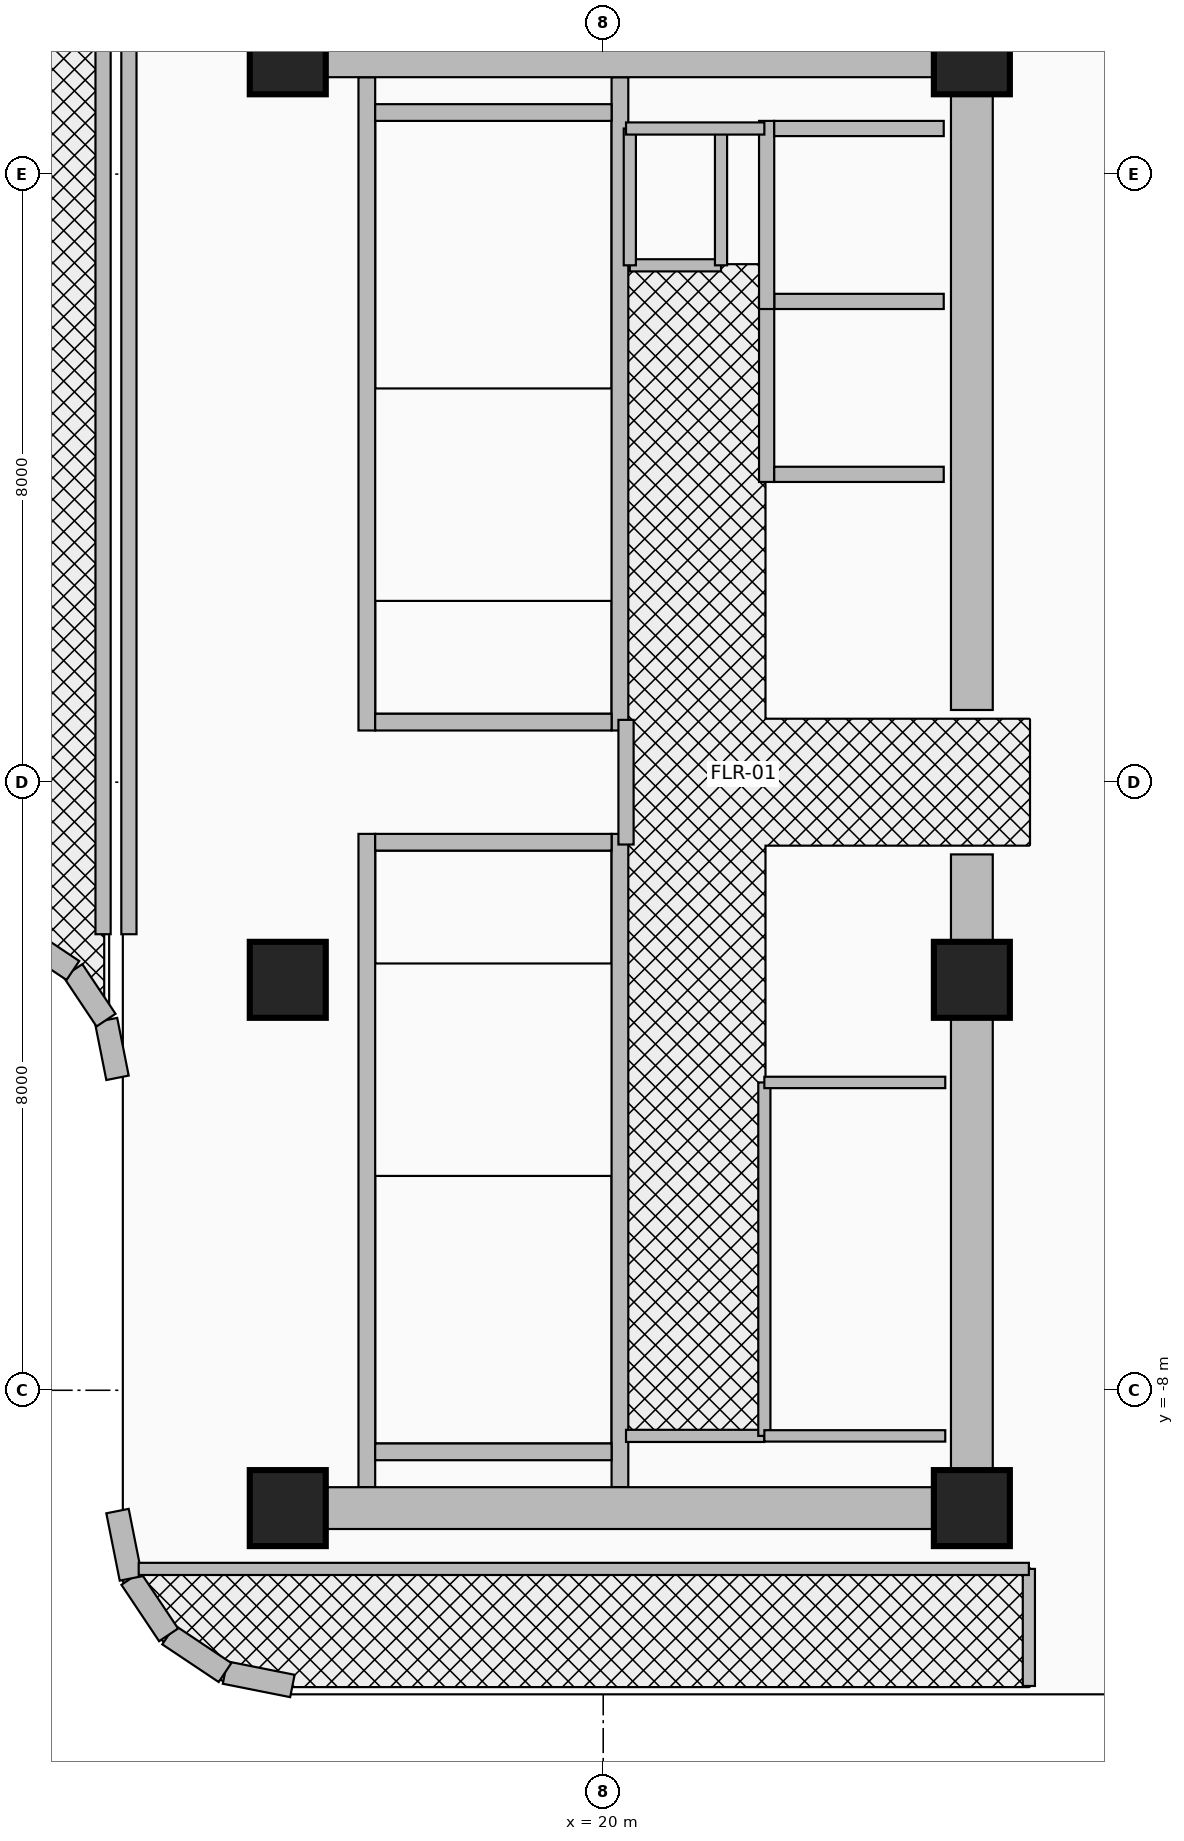
"""IFC4 building model, lengths in metres.
Left out: names, types, materials, properties, quantities, classifications, styles, units other than length and angle.
Written with IfcOpenShell. Run it as: python <this file> out.ifc"""

import sys

from ifc_helpers import new_model, si_unit, direction, frame, frame_2d, origin, origin_2d, place, context, subcontext, project, spatial, rectangle, extrude, source, transform, mapped, element, fill, save


model = new_model("IFC4")
c1 = context("Model", 3, precision=1e-05, world=origin(), true_north=direction((0.0, 1.0)))
c2 = subcontext(c1, "Body", "Model", "MODEL_VIEW")
j1 = project(units=[si_unit("LENGTHUNIT", "METRE"), si_unit("PLANEANGLEUNIT", "RADIAN")], contexts=[c1])
p1 = place(None, origin())
s1 = spatial("IfcSite", under=j1, at=p1, CompositionType="ELEMENT")
p2 = place(p1, origin())
s2 = spatial("IfcBuilding", under=s1, at=p2, CompositionType="ELEMENT")
p3 = place(p2, frame((0.0, 0.0, 180.5)))
s3 = spatial("IfcBuildingStorey", under=s2, at=p3, CompositionType="ELEMENT", Elevation=180.5)
for number, where, z_axis, x_axis in (
    (1, (16.89, 0.68, 0.0), (0.0, 0.0, 1.0), (0.0, 1.0, 0.0)),
    (2, (20.22, 0.68, 0.0), (0.0, 0.0, 1.0), (0.0, 1.0, 0.0)),
):
    element("IfcWall", number, at=place(p3, frame(where, z_axis=z_axis, x_axis=x_axis)), inside=s3, PredefinedType="SHEAR", context=c2, shape_type="SweptSolid", body=[
        extrude(rectangle(XDim=8.595, YDim=0.22, at=frame_2d((4.297, 0.0))), origin(), (0.0, 0.0, 1.0), 3.63),
    ])
p4 = place(p3, frame((17.0, 0.79, 0.0), z_axis=(0.0, 0.0, 1.0), x_axis=(1.0, 0.0, 0.0)))
e3 = element("IfcWall", 3, at=p4, inside=s3, PredefinedType="SHEAR", context=c2, shape_type="SweptSolid", body=[
    extrude(rectangle(XDim=3.11, YDim=0.22, at=frame_2d((1.555, 0.0))), origin(), (0.0, 0.0, 1.0), 3.63),
])
p5 = place(p4, frame((0.95, 0.0, 0.0)))
e4 = element("IfcOpeningElement", 4, at=p5, cuts=e3, PredefinedType="OPENING", context=c2, shape_type="SweptSolid", body=[
    extrude(rectangle(XDim=1.1, YDim=2.15, at=frame_2d((0.55, 1.075))), frame((0.0, 0.125, 0.0), z_axis=(0.0, -1.0, 0.0), x_axis=(1.0, 0.0, 0.0)), (0.0, 0.0, 1.0), 0.25),
])
p6 = place(p3, frame((17.0, 8.81, 0.0), z_axis=(0.0, 0.0, 1.0), x_axis=(1.0, 0.0, 0.0)))
e5 = element("IfcWall", 5, at=p6, inside=s3, PredefinedType="SHEAR", context=c2, shape_type="SweptSolid", body=[
    extrude(rectangle(XDim=3.11, YDim=0.22, at=frame_2d((1.555, 0.0))), origin(), (0.0, 0.0, 1.0), 3.63),
])
for number, where, z_axis, x_axis in (
    (6, (16.89, -9.275, 0.0), (0.0, 0.0, 1.0), (0.0, 1.0, 0.0)),
    (7, (20.22, -9.275, 0.0), (0.0, 0.0, 1.0), (0.0, 1.0, 0.0)),
):
    element("IfcWall", number, at=place(p3, frame(where, z_axis=z_axis, x_axis=x_axis)), inside=s3, PredefinedType="SHEAR", context=c2, shape_type="SweptSolid", body=[
        extrude(rectangle(XDim=8.595, YDim=0.22, at=frame_2d((4.297, 0.0))), origin(), (0.0, 0.0, 1.0), 3.63),
    ])
p7 = place(p3, frame((17.0, -8.81, 0.0), z_axis=(0.0, 0.0, 1.0), x_axis=(1.0, 0.0, 0.0)))
e8 = element("IfcWall", 8, at=p7, inside=s3, PredefinedType="SHEAR", context=c2, shape_type="SweptSolid", body=[
    extrude(rectangle(XDim=3.11, YDim=0.22, at=frame_2d((1.555, 0.0))), origin(), (0.0, 0.0, 1.0), 3.63),
])
p8 = place(p3, frame((17.0, -0.79, 0.0), z_axis=(0.0, 0.0, 1.0), x_axis=(1.0, 0.0, 0.0)))
e9 = element("IfcWall", 9, at=p8, inside=s3, PredefinedType="SHEAR", context=c2, shape_type="SweptSolid", body=[
    extrude(rectangle(XDim=3.11, YDim=0.22, at=frame_2d((1.555, 0.0))), origin(), (0.0, 0.0, 1.0), 3.63),
])
p9 = place(p8, frame((0.95, 0.0, 0.0)))
e10 = element("IfcOpeningElement", 10, at=p9, cuts=e9, PredefinedType="OPENING", context=c2, shape_type="SweptSolid", body=[
    extrude(rectangle(XDim=1.1, YDim=2.15, at=frame_2d((0.55, 1.075))), frame((0.0, 0.125, 0.0), z_axis=(0.0, -1.0, 0.0), x_axis=(1.0, 0.0, 0.0)), (0.0, 0.0, 1.0), 0.25),
])
for number, where, z_axis, x_axis in (
    (11, (24.85, -9.825, 0.0), (0.0, 0.0, 1.0), (0.0, 1.0, 0.0)),
    (12, (24.85, 0.95, 0.0), (0.0, 0.0, 1.0), (0.0, 1.0, 0.0)),
):
    element("IfcWall", number, at=place(p3, frame(where, z_axis=z_axis, x_axis=x_axis)), inside=s3, PredefinedType="SHEAR", context=c2, shape_type="SweptSolid", body=[
        extrude(rectangle(XDim=8.875, YDim=0.55, at=frame_2d((4.438, 0.0))), origin(), (0.0, 0.0, 1.0), 3.63),
    ])
for number, where, z_axis, x_axis in (
    (13, (15.85, 9.55, 0.0), (0.0, 0.0, 1.0), (1.0, 0.0, 0.0)),
    (14, (15.85, -9.55, 0.0), (0.0, 0.0, 1.0), (1.0, 0.0, 0.0)),
):
    element("IfcWall", number, at=place(p3, frame(where, z_axis=z_axis, x_axis=x_axis)), inside=s3, PredefinedType="SHEAR", context=c2, shape_type="SweptSolid", body=[
        extrude(rectangle(XDim=9.0, YDim=0.55, at=frame_2d((4.5, 0.0))), origin(), (0.0, 0.0, 1.0), 3.63),
    ])
m1 = source(origin(), c2, "Body", "SweptSolid", [
    extrude(rectangle(XDim=1.0, YDim=1.0, at=origin_2d()), origin(), (0.0, 0.0, 1.0), 3.95),
])
for number, where, z_axis, x_axis in (
    (15, (15.85, -9.55, 0.0), (0.0, 0.0, 1.0), (1.0, 0.0, 0.0)),
    (16, (24.85, -9.55, 0.0), (0.0, 0.0, 1.0), (1.0, 0.0, 0.0)),
    (17, (15.85, -2.6, 0.0), (0.0, 0.0, 1.0), (1.0, 0.0, 0.0)),
    (18, (24.85, -2.6, 0.0), (0.0, 0.0, 1.0), (1.0, 0.0, 0.0)),
    (19, (15.85, 9.55, 0.0), (0.0, 0.0, 1.0), (1.0, 0.0, 0.0)),
    (20, (24.85, 9.55, 0.0), (0.0, 0.0, 1.0), (1.0, 0.0, 0.0)),
):
    element("IfcColumn", number, at=place(p3, frame(where, z_axis=z_axis, x_axis=x_axis)), inside=s3, PredefinedType="COLUMN", context=c2, shape_type="MappedRepresentation", body=[
        mapped(m1, transform((0.0, 0.0, 0.0), x_axis=(1.0, 0.0, 0.0), y_axis=(0.0, 1.0, 0.0), z_axis=(0.0, 0.0, 1.0), scale=1.0)),
    ])
p10 = place(p3, frame((15.911, -11.89, 0.0), z_axis=(0.0, 0.0, 1.0), x_axis=(-0.980798241101, 0.195025152871, 0.0)))
e21 = element("IfcWall", 21, at=p10, inside=s3, PredefinedType="SOLIDWALL", context=c2, shape_type="SweptSolid", body=[
    extrude(rectangle(XDim=0.904, YDim=0.3, at=frame_2d((0.452, 0.0))), origin(), (0.0, 0.0, 1.0), 3.63),
])
for number, where, z_axis, x_axis in (
    (22, (15.024, -11.714, 0.0), (0.0, 0.0, 1.0), (-0.832, 0.556, 0.0)),
    (23, (14.282, -11.218, 0.0), (0.0, 0.0, 1.0), (-0.556, 0.832, 0.0)),
):
    element("IfcWall", number, at=place(p3, frame(where, z_axis=z_axis, x_axis=x_axis)), inside=s3, PredefinedType="SOLIDWALL", context=c2, shape_type="SweptSolid", body=[
        extrude(rectangle(XDim=0.893, YDim=0.3, at=frame_2d((0.446, 0.0))), origin(), (0.0, 0.0, 1.0), 3.63),
    ])
p11 = place(p3, frame((13.786, -10.476, 0.0), z_axis=(0.0, 0.0, 1.0), x_axis=(-0.195025152871, 0.980798241101, 0.0)))
e24 = element("IfcWall", 24, at=p11, inside=s3, PredefinedType="SOLIDWALL", context=c2, shape_type="SweptSolid", body=[
    extrude(rectangle(XDim=0.904, YDim=0.3, at=frame_2d((0.452, 0.0))), origin(), (0.0, 0.0, 1.0), 3.63),
])
p12 = place(p3, frame((13.61, -3.889, 0.0), z_axis=(0.0, 0.0, 1.0), x_axis=(-0.195206365311, 0.98076219082, 0.0)))
e25 = element("IfcWall", 25, at=p12, inside=s3, PredefinedType="SOLIDWALL", context=c2, shape_type="SweptSolid", body=[
    extrude(rectangle(XDim=0.774, YDim=0.3, at=frame_2d((0.387, 0.0))), origin(), (0.0, 0.0, 1.0), 3.63),
])
for number, where, z_axis, x_axis in (
    (26, (13.459, -3.13, 0.0), (0.0, 0.0, 1.0), (-0.556, 0.831, 0.0)),
    (27, (13.023, -2.477, 0.0), (0.0, 0.0, 1.0), (-0.831, 0.556, 0.0)),
):
    element("IfcWall", number, at=place(p3, frame(where, z_axis=z_axis, x_axis=x_axis)), inside=s3, PredefinedType="SOLIDWALL", context=c2, shape_type="SweptSolid", body=[
        extrude(rectangle(XDim=0.785, YDim=0.3, at=frame_2d((0.393, 0.0))), origin(), (0.0, 0.0, 1.0), 3.63),
    ])
p13 = place(p3, frame((22.15, 3.95, 0.0), z_axis=(0.0, 0.0, 1.0), x_axis=(0.0, 1.0, 0.0)))
e28 = element("IfcWall", 28, at=p13, inside=s3, PredefinedType="MOVABLE", context=c2, shape_type="SweptSolid", body=[
    extrude(rectangle(XDim=2.475, YDim=0.2, at=frame_2d((1.238, 0.0))), origin(), (0.0, 0.0, 1.0), 3.63),
])
p14 = place(p13, frame((0.688, 0.0, 0.0)))
e29 = element("IfcOpeningElement", 29, at=p14, cuts=e28, PredefinedType="OPENING", context=c2, shape_type="SweptSolid", body=[
    extrude(rectangle(XDim=1.1, YDim=2.1, at=frame_2d((0.55, 1.05))), frame((0.0, 0.115, 0.0), z_axis=(0.0, -1.0, 0.0), x_axis=(1.0, 0.0, 0.0)), (0.0, 0.0, 1.0), 0.23),
])
for number, where, z_axis, x_axis in (
    (30, (22.25, 4.05, 0.0), (0.0, 0.0, 1.0), (1.0, 0.0, 0.0)),
    (31, (22.25, 6.325, 0.0), (0.0, 0.0, 1.0), (1.0, 0.0, 0.0)),
):
    element("IfcWall", number, at=place(p3, frame(where, z_axis=z_axis, x_axis=x_axis)), inside=s3, PredefinedType="MOVABLE", context=c2, shape_type="SweptSolid", body=[
        extrude(rectangle(XDim=2.23, YDim=0.2, at=frame_2d((1.115, 0.0))), origin(), (0.0, 0.0, 1.0), 3.63),
    ])
p15 = place(p3, frame((22.15, 6.225, 0.0), z_axis=(0.0, 0.0, 1.0), x_axis=(0.0, 1.0, 0.0)))
e32 = element("IfcWall", 32, at=p15, inside=s3, PredefinedType="MOVABLE", context=c2, shape_type="SweptSolid", body=[
    extrude(rectangle(XDim=2.475, YDim=0.2, at=frame_2d((1.237, 0.0))), origin(), (0.0, 0.0, 1.0), 3.63),
])
p16 = place(p15, frame((0.688, 0.0, 0.0)))
e33 = element("IfcOpeningElement", 33, at=p16, cuts=e32, PredefinedType="OPENING", context=c2, shape_type="SweptSolid", body=[
    extrude(rectangle(XDim=1.1, YDim=2.1, at=frame_2d((0.55, 1.05))), frame((0.0, 0.115, 0.0), z_axis=(0.0, -1.0, 0.0), x_axis=(1.0, 0.0, 0.0)), (0.0, 0.0, 1.0), 0.23),
])
p17 = place(p3, frame((22.25, 8.6, 0.0), z_axis=(0.0, 0.0, 1.0), x_axis=(1.0, 0.0, 0.0)))
e34 = element("IfcWall", 34, at=p17, inside=s3, PredefinedType="MOVABLE", context=c2, shape_type="SweptSolid", body=[
    extrude(rectangle(XDim=2.23, YDim=0.2, at=frame_2d((1.115, 0.0))), origin(), (0.0, 0.0, 1.0), 3.63),
])
p18 = place(p3, frame((20.3, -0.82, 0.0), z_axis=(0.0, 0.0, 1.0), x_axis=(0.0, 1.0, 0.0)))
e35 = element("IfcWall", 35, at=p18, inside=s3, PredefinedType="PARTITIONING", context=c2, shape_type="SweptSolid", body=[
    extrude(rectangle(XDim=1.64, YDim=0.2, at=frame_2d((0.82, 0.0))), origin(), (0.0, 0.0, 1.0), 3.63),
])
p19 = place(p18, frame((0.295, 0.0, 0.0)))
e36 = element("IfcOpeningElement", 36, at=p19, cuts=e35, PredefinedType="OPENING", context=c2, shape_type="SweptSolid", body=[
    extrude(rectangle(XDim=1.05, YDim=2.15, at=frame_2d((0.525, 1.075))), frame((0.0, 0.115, 0.0), z_axis=(0.0, -1.0, 0.0), x_axis=(1.0, 0.0, 0.0)), (0.0, 0.0, 1.0), 0.23),
])
p20 = place(p3, frame((20.35, 6.8, 0.0), z_axis=(0.0, 0.0, 1.0), x_axis=(1.0, 0.0, 0.0)))
e37 = element("IfcWall", 37, at=p20, inside=s3, PredefinedType="PARTITIONING", context=c2, shape_type="SweptSolid", body=[
    extrude(rectangle(XDim=1.2, YDim=0.16, at=frame_2d((0.6, 0.0))), origin(), (0.0, 0.0, 1.0), 3.63),
])
p21 = place(p20, frame((0.175, 0.0, 0.0)))
e38 = element("IfcOpeningElement", 38, at=p21, cuts=e37, PredefinedType="OPENING", context=c2, shape_type="SweptSolid", body=[
    extrude(rectangle(XDim=0.85, YDim=2.05, at=frame_2d((0.425, 1.025))), frame((0.0, 0.095, 0.0), z_axis=(0.0, -1.0, 0.0), x_axis=(1.0, 0.0, 0.0)), (0.0, 0.0, 1.0), 0.19),
])
for number, where, z_axis, x_axis in (
    (39, (21.55, 6.8, 0.0), (0.0, 0.0, 1.0), (0.0, 1.0, 0.0)),
    (40, (20.35, 6.8, 0.0), (0.0, 0.0, 1.0), (0.0, 1.0, 0.0)),
):
    element("IfcWall", number, at=place(p3, frame(where, z_axis=z_axis, x_axis=x_axis)), inside=s3, PredefinedType="PARTITIONING", context=c2, shape_type="SweptSolid", body=[
        extrude(rectangle(XDim=1.8, YDim=0.16, at=frame_2d((0.9, 0.0))), origin(), (0.0, 0.0, 1.0), 3.63),
    ])
for number, where, z_axis, x_axis in (
    (41, (20.3, -8.6, 0.0), (0.0, 0.0, 1.0), (1.0, 0.0, 0.0)),
    (42, (20.3, 8.6, 0.0), (0.0, 0.0, 1.0), (1.0, 0.0, 0.0)),
):
    element("IfcWall", number, at=place(p3, frame(where, z_axis=z_axis, x_axis=x_axis)), inside=s3, PredefinedType="PARTITIONING", context=c2, shape_type="SweptSolid", body=[
        extrude(rectangle(XDim=1.82, YDim=0.16, at=frame_2d((0.91, 0.0))), origin(), (0.0, 0.0, 1.0), 3.63),
    ])
p22 = place(p3, frame((22.12, -8.6, 0.0), z_axis=(0.0, 0.0, 1.0), x_axis=(0.0, 1.0, 0.0)))
e43 = element("IfcWall", 43, at=p22, inside=s3, PredefinedType="PARTITIONING", context=c2, shape_type="SweptSolid", body=[
    extrude(rectangle(XDim=4.65, YDim=0.16, at=frame_2d((2.325, 0.0))), origin(), (0.0, 0.0, 1.0), 3.63),
])
p23 = place(p22, frame((1.8, 0.0, 0.0)))
e44 = element("IfcOpeningElement", 44, at=p23, cuts=e43, PredefinedType="OPENING", context=c2, shape_type="SweptSolid", body=[
    extrude(rectangle(XDim=0.95, YDim=2.15, at=frame_2d((0.475, 1.075))), frame((0.0, 0.095, 0.0), z_axis=(0.0, -1.0, 0.0), x_axis=(1.0, 0.0, 0.0)), (0.0, 0.0, 1.0), 0.19),
])
for number, where, z_axis, x_axis in (
    (45, (22.12, -3.95, 0.0), (0.0, 0.0, 1.0), (1.0, 0.0, 0.0)),
    (46, (22.12, -8.6, 0.0), (0.0, 0.0, 1.0), (1.0, 0.0, 0.0)),
):
    element("IfcWall", number, at=place(p3, frame(where, z_axis=z_axis, x_axis=x_axis)), inside=s3, PredefinedType="PARTITIONING", context=c2, shape_type="SweptSolid", body=[
        extrude(rectangle(XDim=2.38, YDim=0.15, at=frame_2d((1.19, 0.0))), origin(), (0.0, 0.0, 1.0), 3.63),
    ])
for number, where, z_axis, x_axis in (
    (47, (13.42, -2.0, 0.0), (0.0, 0.0, 1.0), (0.0, 1.0, 0.0)),
    (48, (13.76, -2.0, 0.0), (0.0, 0.0, 1.0), (0.0, 1.0, 0.0)),
):
    element("IfcWall", number, at=place(p3, frame(where, z_axis=z_axis, x_axis=x_axis)), inside=s3, PredefinedType="PARTITIONING", context=c2, shape_type="SweptSolid", body=[
        extrude(rectangle(XDim=13.42, YDim=0.2, at=frame_2d((6.71, 0.0))), origin(), (0.0, 0.0, 1.0), 2.665),
    ])
p24 = place(p3, frame((25.6, -11.89, 0.0), z_axis=(0.0, 0.0, 1.0), x_axis=(0.0, 1.0, 0.0)))
e49 = element("IfcWall", 49, at=p24, inside=s3, PredefinedType="PARTITIONING", context=c2, shape_type="SweptSolid", body=[
    extrude(rectangle(XDim=1.54, YDim=0.16, at=frame_2d((0.77, 0.0))), origin(), (0.0, 0.0, 1.0), 3.63),
])
p25 = place(p24, frame((0.32, 0.0, 0.0)))
e50 = element("IfcOpeningElement", 50, at=p25, cuts=e49, PredefinedType="OPENING", context=c2, shape_type="SweptSolid", body=[
    extrude(rectangle(XDim=0.9, YDim=2.1, at=frame_2d((0.45, 1.05))), frame((0.0, 0.095, 0.0), z_axis=(0.0, -1.0, 0.0), x_axis=(1.0, 0.0, 0.0)), (0.0, 0.0, 1.0), 0.19),
])
p26 = place(p3, frame((13.889, -10.35, 0.0), z_axis=(0.0, 0.0, 1.0), x_axis=(1.0, 0.0, 0.0)))
e51 = element("IfcWall", 51, at=p26, inside=s3, PredefinedType="PARTITIONING", context=c2, shape_type="SweptSolid", body=[
    extrude(rectangle(XDim=11.711, YDim=0.16, at=frame_2d((5.855, 0.0))), origin(), (0.0, 0.0, 1.0), 3.63),
])
p27 = place(p14, origin())
e52 = element("IfcDoor", 52, at=p27, inside=s3, OperationType="DOUBLE_DOOR_SLIDING", PredefinedType="DOOR", context=c2, shape_type="SweptSolid", body=[
    extrude(rectangle(XDim=1.1, YDim=2.1, at=frame_2d((0.55, 1.05))), frame((0.0, 0.025, 0.0), z_axis=(0.0, -1.0, 0.0), x_axis=(1.0, 0.0, 0.0)), (0.0, 0.0, 1.0), 0.05),
])
fill(e29, e52)
p28 = place(p16, origin())
e53 = element("IfcDoor", 53, at=p28, inside=s3, OperationType="DOUBLE_DOOR_SLIDING", PredefinedType="DOOR", context=c2, shape_type="SweptSolid", body=[
    extrude(rectangle(XDim=1.1, YDim=2.1, at=frame_2d((0.55, 1.05))), frame((0.0, 0.025, 0.0), z_axis=(0.0, -1.0, 0.0), x_axis=(1.0, 0.0, 0.0)), (0.0, 0.0, 1.0), 0.05),
])
fill(e33, e53)
p29 = place(p19, origin())
e54 = element("IfcDoor", 54, at=p29, inside=s3, OperationType="SINGLE_SWING_RIGHT", PredefinedType="DOOR", context=c2, shape_type="SweptSolid", body=[
    extrude(rectangle(XDim=1.05, YDim=2.15, at=frame_2d((0.525, 1.075))), frame((0.0, 0.025, 0.0), z_axis=(0.0, -1.0, 0.0), x_axis=(1.0, 0.0, 0.0)), (0.0, 0.0, 1.0), 0.05),
])
fill(e36, e54)
p30 = place(p5, frame((1.1, 0.0, 0.0), z_axis=(0.0, 0.0, 1.0), x_axis=(-1.0, 0.0, 0.0)))
e55 = element("IfcDoor", 55, at=p30, inside=s3, OperationType="SINGLE_SWING_LEFT", PredefinedType="DOOR", context=c2, shape_type="SweptSolid", body=[
    extrude(rectangle(XDim=1.1, YDim=2.15, at=frame_2d((0.55, 1.075))), frame((0.0, 0.025, 0.0), z_axis=(0.0, -1.0, 0.0), x_axis=(1.0, 0.0, 0.0)), (0.0, 0.0, 1.0), 0.05),
])
fill(e4, e55)
p31 = place(p9, origin())
e56 = element("IfcDoor", 56, at=p31, inside=s3, OperationType="SINGLE_SWING_RIGHT", PredefinedType="DOOR", context=c2, shape_type="SweptSolid", body=[
    extrude(rectangle(XDim=1.1, YDim=2.15, at=frame_2d((0.55, 1.075))), frame((0.0, 0.025, 0.0), z_axis=(0.0, -1.0, 0.0), x_axis=(1.0, 0.0, 0.0)), (0.0, 0.0, 1.0), 0.05),
])
fill(e10, e56)
p32 = place(p21, origin())
e57 = element("IfcDoor", 57, at=p32, inside=s3, OperationType="SINGLE_SWING_LEFT", PredefinedType="DOOR", context=c2, shape_type="SweptSolid", body=[
    extrude(rectangle(XDim=0.85, YDim=2.05, at=frame_2d((0.425, 1.025))), frame((0.0, 0.025, 0.0), z_axis=(0.0, -1.0, 0.0), x_axis=(1.0, 0.0, 0.0)), (0.0, 0.0, 1.0), 0.05),
])
fill(e38, e57)
p33 = place(p23, origin())
e58 = element("IfcDoor", 58, at=p33, inside=s3, OperationType="SINGLE_SWING_RIGHT", PredefinedType="DOOR", context=c2, shape_type="SweptSolid", body=[
    extrude(rectangle(XDim=0.95, YDim=2.15, at=frame_2d((0.475, 1.075))), frame((0.0, 0.025, 0.0), z_axis=(0.0, -1.0, 0.0), x_axis=(1.0, 0.0, 0.0)), (0.0, 0.0, 1.0), 0.05),
])
fill(e44, e58)
p34 = place(p25, origin())
e59 = element("IfcDoor", 59, at=p34, inside=s3, OperationType="SINGLE_SWING_RIGHT", PredefinedType="DOOR", context=c2, shape_type="SweptSolid", body=[
    extrude(rectangle(XDim=0.9, YDim=2.1, at=frame_2d((0.45, 1.05))), frame((0.0, 0.025, 0.0), z_axis=(0.0, -1.0, 0.0), x_axis=(1.0, 0.0, 0.0)), (0.0, 0.0, 1.0), 0.05),
])
fill(e50, e59)
save(model, sys.argv[1])
